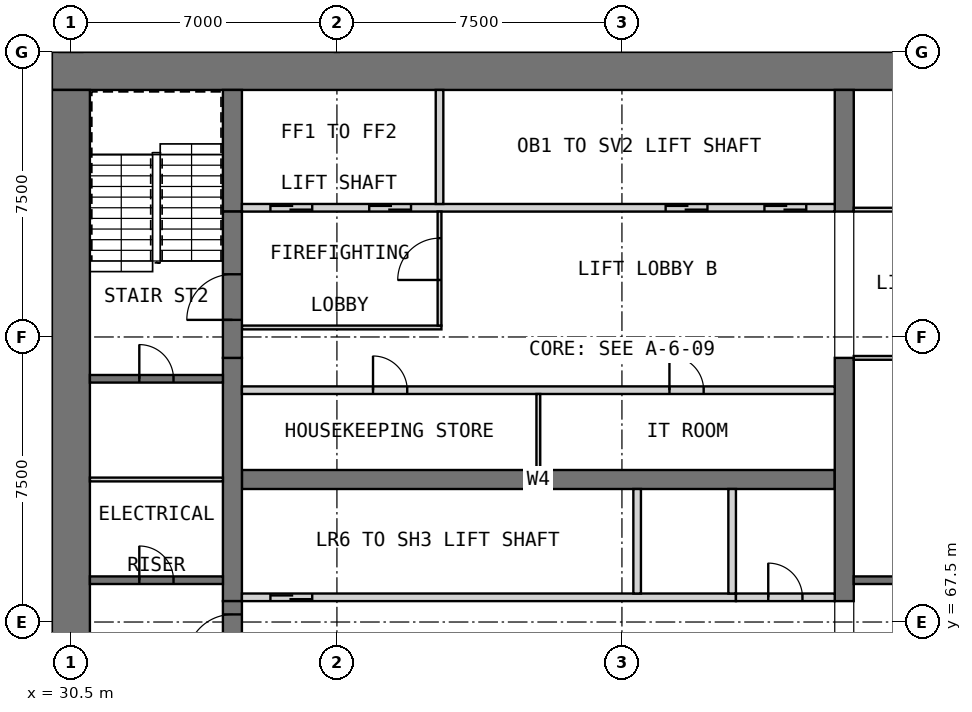
"""IFC4 building model, lengths in metres.
Left out: names, types, materials, properties, quantities, classifications, styles, units other than length and angle.
Written with IfcOpenShell. Run it as: python <this file> out.ifc"""

import sys

from ifc_helpers import new_model, si_unit, direction, frame, frame_2d, origin, place, context, subcontext, project, spatial, rectangle, extrude, element, fill, save


model = new_model("IFC4")
c1 = context("Model", 3, precision=1e-05, world=origin(), true_north=direction((0.0, 1.0)))
c2 = subcontext(c1, "Body", "Model", "MODEL_VIEW")
j1 = project(units=[si_unit("LENGTHUNIT", "METRE"), si_unit("PLANEANGLEUNIT", "RADIAN")], contexts=[c1])
p1 = place(None, origin())
s1 = spatial("IfcSite", under=j1, at=p1, CompositionType="ELEMENT")
p2 = place(p1, origin())
s2 = spatial("IfcBuilding", under=s1, at=p2, CompositionType="ELEMENT")
p3 = place(p2, frame((0.0, 0.0, 48.4)))
s3 = spatial("IfcBuildingStorey", under=s2, at=p3, CompositionType="ELEMENT", Elevation=48.4)
p4 = place(p3, frame((30.0, 82.0, 0.0), z_axis=(0.0, 0.0, 1.0), x_axis=(1.0, 0.0, 0.0)))
e1 = element("IfcWall", 1, at=p4, inside=s3, PredefinedType="SHEAR", context=c2, shape_type="SweptSolid", body=[
    extrude(rectangle(XDim=30.0, YDim=1.0, at=frame_2d((15.0, 0.0))), origin(), (0.0, 0.0, 1.0), 3.6),
])
p5 = place(p3, frame((30.5, 61.0, 0.0), z_axis=(0.0, 0.0, 1.0), x_axis=(0.0, 1.0, 0.0)))
e2 = element("IfcWall", 2, at=p5, inside=s3, PredefinedType="SHEAR", context=c2, shape_type="SweptSolid", body=[
    extrude(rectangle(XDim=20.5, YDim=1.0, at=frame_2d((10.25, 0.0))), origin(), (0.0, 0.0, 1.0), 3.6),
])
p6 = place(p3, frame((35.0, 71.25, 0.0), z_axis=(0.0, 0.0, 1.0), x_axis=(1.0, 0.0, 0.0)))
e3 = element("IfcWall", 3, at=p6, inside=s3, PredefinedType="SHEAR", context=c2, shape_type="SweptSolid", body=[
    extrude(rectangle(XDim=15.6, YDim=0.5, at=frame_2d((7.8, 0.0))), origin(), (0.0, 0.0, 1.0), 3.6),
])
p7 = place(p3, frame((34.75, 68.05, 0.0), z_axis=(0.0, 0.0, 1.0), x_axis=(0.0, 1.0, 0.0)))
e4 = element("IfcWall", 4, at=p7, inside=s3, PredefinedType="SHEAR", context=c2, shape_type="SweptSolid", body=[
    extrude(rectangle(XDim=6.4, YDim=0.5, at=frame_2d((3.2, 0.0))), origin(), (0.0, 0.0, 1.0), 3.6),
])
p8 = place(p3, frame((34.75, 78.3, 0.0), z_axis=(0.0, 0.0, 1.0), x_axis=(0.0, 1.0, 0.0)))
e5 = element("IfcWall", 5, at=p8, inside=s3, PredefinedType="SHEAR", context=c2, shape_type="SweptSolid", body=[
    extrude(rectangle(XDim=3.2, YDim=0.5, at=frame_2d((1.6, 0.0))), origin(), (0.0, 0.0, 1.0), 3.6),
])
p9 = place(p3, frame((50.85, 68.05, 0.0), z_axis=(0.0, 0.0, 1.0), x_axis=(0.0, 1.0, 0.0)))
e6 = element("IfcWall", 6, at=p9, inside=s3, PredefinedType="SHEAR", context=c2, shape_type="SweptSolid", body=[
    extrude(rectangle(XDim=6.4, YDim=0.5, at=frame_2d((3.2, 0.0))), origin(), (0.0, 0.0, 1.0), 3.6),
])
p10 = place(p3, frame((50.85, 78.3, 0.0), z_axis=(0.0, 0.0, 1.0), x_axis=(0.0, 1.0, 0.0)))
e7 = element("IfcWall", 7, at=p10, inside=s3, PredefinedType="SHEAR", context=c2, shape_type="SweptSolid", body=[
    extrude(rectangle(XDim=3.2, YDim=0.5, at=frame_2d((1.6, 0.0))), origin(), (0.0, 0.0, 1.0), 3.6),
])
p11 = place(p3, frame((35.0, 68.15, 0.0), z_axis=(0.0, 0.0, 1.0), x_axis=(1.0, 0.0, 0.0)))
e8 = element("IfcWall", 8, at=p11, inside=s3, PredefinedType="SOLIDWALL", context=c2, shape_type="SweptSolid", body=[
    extrude(rectangle(XDim=13.0, YDim=0.2, at=frame_2d((6.5, 0.0))), origin(), (0.0, 0.0, 1.0), 3.6),
])
p12 = place(p11, frame((0.75, 0.0, 0.0)))
e9 = element("IfcOpeningElement", 9, at=p12, cuts=e8, PredefinedType="OPENING", context=c2, shape_type="SweptSolid", body=[
    extrude(rectangle(XDim=1.1, YDim=2.1, at=frame_2d((0.55, 1.05))), frame((0.0, 0.11, 0.0), z_axis=(0.0, -1.0, 0.0), x_axis=(1.0, 0.0, 0.0)), (0.0, 0.0, 1.0), 0.22),
])
for number, where, z_axis, x_axis in (
    (10, (45.4, 68.25, 0.0), (0.0, 0.0, 1.0), (0.0, 1.0, 0.0)),
    (11, (47.9, 68.25, 0.0), (0.0, 0.0, 1.0), (0.0, 1.0, 0.0)),
):
    element("IfcWall", number, at=place(p3, frame(where, z_axis=z_axis, x_axis=x_axis)), inside=s3, PredefinedType="SOLIDWALL", context=c2, shape_type="SweptSolid", body=[
        extrude(rectangle(XDim=2.75, YDim=0.2, at=frame_2d((1.375, 0.0))), origin(), (0.0, 0.0, 1.0), 3.6),
    ])
p13 = place(p3, frame((48.0, 68.15, 0.0), z_axis=(0.0, 0.0, 1.0), x_axis=(1.0, 0.0, 0.0)))
e12 = element("IfcWall", 12, at=p13, inside=s3, PredefinedType="PARTITIONING", context=c2, shape_type="SweptSolid", body=[
    extrude(rectangle(XDim=2.6, YDim=0.2, at=frame_2d((1.3, 0.0))), origin(), (0.0, 0.0, 1.0), 3.35),
])
p14 = place(p13, frame((0.85, 0.0, 0.0)))
e13 = element("IfcOpeningElement", 13, at=p14, cuts=e12, PredefinedType="OPENING", context=c2, shape_type="SweptSolid", body=[
    extrude(rectangle(XDim=0.9, YDim=2.1, at=frame_2d((0.45, 1.05))), frame((0.0, 0.11, 0.0), z_axis=(0.0, -1.0, 0.0), x_axis=(1.0, 0.0, 0.0)), (0.0, 0.0, 1.0), 0.22),
])
p15 = place(p3, frame((35.0, 73.6, 0.0), z_axis=(0.0, 0.0, 1.0), x_axis=(1.0, 0.0, 0.0)))
e14 = element("IfcWall", 14, at=p15, inside=s3, PredefinedType="PARTITIONING", context=c2, shape_type="SweptSolid", body=[
    extrude(rectangle(XDim=15.6, YDim=0.2, at=frame_2d((7.8, 0.0))), origin(), (0.0, 0.0, 1.0), 3.35),
])
p16 = place(p15, frame((3.45, 0.0, 0.0)))
e15 = element("IfcOpeningElement", 15, at=p16, cuts=e14, PredefinedType="OPENING", context=c2, shape_type="SweptSolid", body=[
    extrude(rectangle(XDim=0.9, YDim=2.1, at=frame_2d((0.45, 1.05))), frame((0.0, 0.11, 0.0), z_axis=(0.0, -1.0, 0.0), x_axis=(1.0, 0.0, 0.0)), (0.0, 0.0, 1.0), 0.22),
])
p17 = place(p15, frame((11.25, 0.0, 0.0)))
e16 = element("IfcOpeningElement", 16, at=p17, cuts=e14, PredefinedType="OPENING", context=c2, shape_type="SweptSolid", body=[
    extrude(rectangle(XDim=0.9, YDim=2.1, at=frame_2d((0.45, 1.05))), frame((0.0, 0.11, 0.0), z_axis=(0.0, -1.0, 0.0), x_axis=(1.0, 0.0, 0.0)), (0.0, 0.0, 1.0), 0.22),
])
p18 = place(p3, frame((42.8, 71.5, 0.0), z_axis=(0.0, 0.0, 1.0), x_axis=(0.0, 1.0, 0.0)))
e17 = element("IfcWall", 17, at=p18, inside=s3, PredefinedType="PARTITIONING", context=c2, shape_type="SweptSolid", body=[
    extrude(rectangle(XDim=2.0, YDim=0.1, at=frame_2d((1.0, 0.0))), origin(), (0.0, 0.0, 1.0), 3.35),
])
p19 = place(p3, frame((35.0, 78.4, 0.0), z_axis=(0.0, 0.0, 1.0), x_axis=(1.0, 0.0, 0.0)))
e18 = element("IfcWall", 18, at=p19, inside=s3, PredefinedType="SOLIDWALL", context=c2, shape_type="SweptSolid", body=[
    extrude(rectangle(XDim=15.6, YDim=0.2, at=frame_2d((7.8, 0.0))), origin(), (0.0, 0.0, 1.0), 3.6),
])
p20 = place(p19, frame((0.75, 0.0, 0.0)))
e19 = element("IfcOpeningElement", 19, at=p20, cuts=e18, PredefinedType="OPENING", context=c2, shape_type="SweptSolid", body=[
    extrude(rectangle(XDim=1.1, YDim=2.1, at=frame_2d((0.55, 1.05))), frame((0.0, 0.11, 0.0), z_axis=(0.0, -1.0, 0.0), x_axis=(1.0, 0.0, 0.0)), (0.0, 0.0, 1.0), 0.22),
])
p21 = place(p19, frame((3.35, 0.0, 0.0)))
e20 = element("IfcOpeningElement", 20, at=p21, cuts=e18, PredefinedType="OPENING", context=c2, shape_type="SweptSolid", body=[
    extrude(rectangle(XDim=1.1, YDim=2.1, at=frame_2d((0.55, 1.05))), frame((0.0, 0.11, 0.0), z_axis=(0.0, -1.0, 0.0), x_axis=(1.0, 0.0, 0.0)), (0.0, 0.0, 1.0), 0.22),
])
p22 = place(p19, frame((11.15, 0.0, 0.0)))
e21 = element("IfcOpeningElement", 21, at=p22, cuts=e18, PredefinedType="OPENING", context=c2, shape_type="SweptSolid", body=[
    extrude(rectangle(XDim=1.1, YDim=2.1, at=frame_2d((0.55, 1.05))), frame((0.0, 0.11, 0.0), z_axis=(0.0, -1.0, 0.0), x_axis=(1.0, 0.0, 0.0)), (0.0, 0.0, 1.0), 0.22),
])
p23 = place(p19, frame((13.75, 0.0, 0.0)))
e22 = element("IfcOpeningElement", 22, at=p23, cuts=e18, PredefinedType="OPENING", context=c2, shape_type="SweptSolid", body=[
    extrude(rectangle(XDim=1.1, YDim=2.1, at=frame_2d((0.55, 1.05))), frame((0.0, 0.11, 0.0), z_axis=(0.0, -1.0, 0.0), x_axis=(1.0, 0.0, 0.0)), (0.0, 0.0, 1.0), 0.22),
])
p24 = place(p3, frame((40.2, 78.5, 0.0), z_axis=(0.0, 0.0, 1.0), x_axis=(0.0, 1.0, 0.0)))
e23 = element("IfcWall", 23, at=p24, inside=s3, PredefinedType="SOLIDWALL", context=c2, shape_type="SweptSolid", body=[
    extrude(rectangle(XDim=3.0, YDim=0.2, at=frame_2d((1.5, 0.0))), origin(), (0.0, 0.0, 1.0), 3.6),
])
p25 = place(p3, frame((35.0, 75.25, 0.0), z_axis=(0.0, 0.0, 1.0), x_axis=(1.0, 0.0, 0.0)))
e24 = element("IfcWall", 24, at=p25, inside=s3, PredefinedType="PARTITIONING", context=c2, shape_type="SweptSolid", body=[
    extrude(rectangle(XDim=5.25, YDim=0.1, at=frame_2d((2.625, 0.0))), origin(), (0.0, 0.0, 1.0), 3.35),
])
p26 = place(p3, frame((40.2, 75.3, 0.0), z_axis=(0.0, 0.0, 1.0), x_axis=(0.0, 1.0, 0.0)))
e25 = element("IfcWall", 25, at=p26, inside=s3, PredefinedType="PARTITIONING", context=c2, shape_type="SweptSolid", body=[
    extrude(rectangle(XDim=3.0, YDim=0.1, at=frame_2d((1.5, 0.0))), origin(), (0.0, 0.0, 1.0), 3.35),
])
p27 = place(p26, frame((1.2, 0.0, 0.0)))
e26 = element("IfcOpeningElement", 26, at=p27, cuts=e25, PredefinedType="OPENING", context=c2, shape_type="SweptSolid", body=[
    extrude(rectangle(XDim=1.1, YDim=2.1, at=frame_2d((0.55, 1.05))), frame((0.0, 0.06, 0.0), z_axis=(0.0, -1.0, 0.0), x_axis=(1.0, 0.0, 0.0)), (0.0, 0.0, 1.0), 0.12),
])
p28 = place(p3, frame((34.75, 64.2, 0.0), z_axis=(0.0, 0.0, 1.0), x_axis=(0.0, 1.0, 0.0)))
e27 = element("IfcWall", 27, at=p28, inside=s3, PredefinedType="SOLIDWALL", context=c2, shape_type="SweptSolid", body=[
    extrude(rectangle(XDim=3.85, YDim=0.5, at=frame_2d((1.925, 0.0))), origin(), (0.0, 0.0, 1.0), 2.4),
])
p29 = place(p28, frame((2.3, 0.0, 0.0)))
e28 = element("IfcOpeningElement", 28, at=p29, cuts=e27, PredefinedType="OPENING", context=c2, shape_type="SweptSolid", body=[
    extrude(rectangle(XDim=1.2, YDim=2.1, at=frame_2d((0.6, 1.05))), frame((0.0, 0.26, 0.0), z_axis=(0.0, -1.0, 0.0), x_axis=(1.0, 0.0, 0.0)), (0.0, 0.0, 1.0), 0.52),
])
p30 = place(p3, frame((34.75, 74.45, 0.0), z_axis=(0.0, 0.0, 1.0), x_axis=(0.0, 1.0, 0.0)))
e29 = element("IfcWall", 29, at=p30, inside=s3, PredefinedType="SOLIDWALL", context=c2, shape_type="SweptSolid", body=[
    extrude(rectangle(XDim=3.85, YDim=0.5, at=frame_2d((1.925, 0.0))), origin(), (0.0, 0.0, 1.0), 2.4),
])
p31 = place(p30, frame((1.0, 0.0, 0.0)))
e30 = element("IfcOpeningElement", 30, at=p31, cuts=e29, PredefinedType="OPENING", context=c2, shape_type="SweptSolid", body=[
    extrude(rectangle(XDim=1.2, YDim=2.1, at=frame_2d((0.6, 1.05))), frame((0.0, 0.26, 0.0), z_axis=(0.0, -1.0, 0.0), x_axis=(1.0, 0.0, 0.0)), (0.0, 0.0, 1.0), 0.52),
])
p32 = place(p3, frame((31.0, 68.6, 0.0), z_axis=(0.0, 0.0, 1.0), x_axis=(1.0, 0.0, 0.0)))
e31 = element("IfcWall", 31, at=p32, inside=s3, PredefinedType="SOLIDWALL", context=c2, shape_type="SweptSolid", body=[
    extrude(rectangle(XDim=3.5, YDim=0.2, at=frame_2d((1.75, 0.0))), origin(), (0.0, 0.0, 1.0), 3.35),
])
p33 = place(p32, frame((1.3, 0.0, 0.0)))
e32 = element("IfcOpeningElement", 32, at=p33, cuts=e31, PredefinedType="OPENING", context=c2, shape_type="SweptSolid", body=[
    extrude(rectangle(XDim=0.9, YDim=2.1, at=frame_2d((0.45, 1.05))), frame((0.0, 0.11, 0.0), z_axis=(0.0, -1.0, 0.0), x_axis=(1.0, 0.0, 0.0)), (0.0, 0.0, 1.0), 0.22),
])
p34 = place(p3, frame((31.0, 73.9, 0.0), z_axis=(0.0, 0.0, 1.0), x_axis=(1.0, 0.0, 0.0)))
e33 = element("IfcWall", 33, at=p34, inside=s3, PredefinedType="SOLIDWALL", context=c2, shape_type="SweptSolid", body=[
    extrude(rectangle(XDim=3.5, YDim=0.2, at=frame_2d((1.75, 0.0))), origin(), (0.0, 0.0, 1.0), 3.35),
])
p35 = place(p34, frame((1.3, 0.0, 0.0)))
e34 = element("IfcOpeningElement", 34, at=p35, cuts=e33, PredefinedType="OPENING", context=c2, shape_type="SweptSolid", body=[
    extrude(rectangle(XDim=0.9, YDim=2.1, at=frame_2d((0.45, 1.05))), frame((0.0, 0.11, 0.0), z_axis=(0.0, -1.0, 0.0), x_axis=(1.0, 0.0, 0.0)), (0.0, 0.0, 1.0), 0.22),
])
p36 = place(p3, frame((51.1, 68.6, 0.0), z_axis=(0.0, 0.0, 1.0), x_axis=(1.0, 0.0, 0.0)))
e35 = element("IfcWall", 35, at=p36, inside=s3, PredefinedType="SOLIDWALL", context=c2, shape_type="SweptSolid", body=[
    extrude(rectangle(XDim=7.9, YDim=0.2, at=frame_2d((3.95, 0.0))), origin(), (0.0, 0.0, 1.0), 3.35),
])
p37 = place(p3, frame((31.0, 71.25, 0.0), z_axis=(0.0, 0.0, 1.0), x_axis=(1.0, 0.0, 0.0)))
e36 = element("IfcWall", 36, at=p37, inside=s3, PredefinedType="PARTITIONING", context=c2, shape_type="SweptSolid", body=[
    extrude(rectangle(XDim=3.5, YDim=0.1, at=frame_2d((1.75, 0.0))), origin(), (0.0, 0.0, 1.0), 3.35),
])
p38 = place(p3, frame((51.1, 74.45, 0.0), z_axis=(0.0, 0.0, 1.0), x_axis=(1.0, 0.0, 0.0)))
e37 = element("IfcWall", 37, at=p38, inside=s3, PredefinedType="PARTITIONING", context=c2, shape_type="SweptSolid", body=[
    extrude(rectangle(XDim=7.9, YDim=0.1, at=frame_2d((3.95, 0.0))), origin(), (0.0, 0.0, 1.0), 3.35),
])
p39 = place(p38, frame((3.5, 0.0, 0.0)))
e38 = element("IfcOpeningElement", 38, at=p39, cuts=e37, PredefinedType="OPENING", context=c2, shape_type="SweptSolid", body=[
    extrude(rectangle(XDim=0.9, YDim=2.1, at=frame_2d((0.45, 1.05))), frame((0.0, 0.06, 0.0), z_axis=(0.0, -1.0, 0.0), x_axis=(1.0, 0.0, 0.0)), (0.0, 0.0, 1.0), 0.12),
])
p40 = place(p3, frame((51.1, 78.35, 0.0), z_axis=(0.0, 0.0, 1.0), x_axis=(1.0, 0.0, 0.0)))
e39 = element("IfcWall", 39, at=p40, inside=s3, PredefinedType="PARTITIONING", context=c2, shape_type="SweptSolid", body=[
    extrude(rectangle(XDim=7.9, YDim=0.1, at=frame_2d((3.95, 0.0))), origin(), (0.0, 0.0, 1.0), 3.35),
])
p41 = place(p40, frame((3.5, 0.0, 0.0)))
e40 = element("IfcOpeningElement", 40, at=p41, cuts=e39, PredefinedType="OPENING", context=c2, shape_type="SweptSolid", body=[
    extrude(rectangle(XDim=0.9, YDim=2.1, at=frame_2d((0.45, 1.05))), frame((0.0, 0.06, 0.0), z_axis=(0.0, -1.0, 0.0), x_axis=(1.0, 0.0, 0.0)), (0.0, 0.0, 1.0), 0.12),
])
p42 = place(p3, frame((37.5, 82.5, 0.0), z_axis=(0.0, 0.0, 1.0), x_axis=(0.0, 1.0, 0.0)))
e41 = element("IfcWall", 41, at=p42, inside=s3, PredefinedType="PARTITIONING", context=c2, shape_type="SweptSolid", body=[
    extrude(rectangle(XDim=7.425, YDim=0.1, at=frame_2d((3.712, 0.0))), origin(), (0.0, 0.0, 1.0), 3.35),
])
p43 = place(p12, origin())
e42 = element("IfcDoor", 42, at=p43, inside=s3, OperationType="DOUBLE_DOOR_SLIDING", PredefinedType="DOOR", context=c2, shape_type="SweptSolid", body=[
    extrude(rectangle(XDim=1.1, YDim=2.1, at=frame_2d((0.55, 1.05))), frame((0.0, 0.025, 0.0), z_axis=(0.0, -1.0, 0.0), x_axis=(1.0, 0.0, 0.0)), (0.0, 0.0, 1.0), 0.05),
])
fill(e9, e42)
p44 = place(p14, origin())
e43 = element("IfcDoor", 43, at=p44, inside=s3, OperationType="SINGLE_SWING_RIGHT", PredefinedType="DOOR", context=c2, shape_type="SweptSolid", body=[
    extrude(rectangle(XDim=0.9, YDim=2.1, at=frame_2d((0.45, 1.05))), frame((0.0, 0.025, 0.0), z_axis=(0.0, -1.0, 0.0), x_axis=(1.0, 0.0, 0.0)), (0.0, 0.0, 1.0), 0.05),
])
fill(e13, e43)
p45 = place(p16, origin())
e44 = element("IfcDoor", 44, at=p45, inside=s3, OperationType="SINGLE_SWING_RIGHT", PredefinedType="DOOR", context=c2, shape_type="SweptSolid", body=[
    extrude(rectangle(XDim=0.9, YDim=2.1, at=frame_2d((0.45, 1.05))), frame((0.0, 0.025, 0.0), z_axis=(0.0, -1.0, 0.0), x_axis=(1.0, 0.0, 0.0)), (0.0, 0.0, 1.0), 0.05),
])
fill(e15, e44)
p46 = place(p17, origin())
e45 = element("IfcDoor", 45, at=p46, inside=s3, OperationType="SINGLE_SWING_LEFT", PredefinedType="DOOR", context=c2, shape_type="SweptSolid", body=[
    extrude(rectangle(XDim=0.9, YDim=2.1, at=frame_2d((0.45, 1.05))), frame((0.0, 0.025, 0.0), z_axis=(0.0, -1.0, 0.0), x_axis=(1.0, 0.0, 0.0)), (0.0, 0.0, 1.0), 0.05),
])
fill(e16, e45)
p47 = place(p20, origin())
e46 = element("IfcDoor", 46, at=p47, inside=s3, OperationType="DOUBLE_DOOR_SLIDING", PredefinedType="DOOR", context=c2, shape_type="SweptSolid", body=[
    extrude(rectangle(XDim=1.1, YDim=2.1, at=frame_2d((0.55, 1.05))), frame((0.0, 0.025, 0.0), z_axis=(0.0, -1.0, 0.0), x_axis=(1.0, 0.0, 0.0)), (0.0, 0.0, 1.0), 0.05),
])
fill(e19, e46)
p48 = place(p21, origin())
e47 = element("IfcDoor", 47, at=p48, inside=s3, OperationType="DOUBLE_DOOR_SLIDING", PredefinedType="DOOR", context=c2, shape_type="SweptSolid", body=[
    extrude(rectangle(XDim=1.1, YDim=2.1, at=frame_2d((0.55, 1.05))), frame((0.0, 0.025, 0.0), z_axis=(0.0, -1.0, 0.0), x_axis=(1.0, 0.0, 0.0)), (0.0, 0.0, 1.0), 0.05),
])
fill(e20, e47)
p49 = place(p22, origin())
e48 = element("IfcDoor", 48, at=p49, inside=s3, OperationType="DOUBLE_DOOR_SLIDING", PredefinedType="DOOR", context=c2, shape_type="SweptSolid", body=[
    extrude(rectangle(XDim=1.1, YDim=2.1, at=frame_2d((0.55, 1.05))), frame((0.0, 0.025, 0.0), z_axis=(0.0, -1.0, 0.0), x_axis=(1.0, 0.0, 0.0)), (0.0, 0.0, 1.0), 0.05),
])
fill(e21, e48)
p50 = place(p23, origin())
e49 = element("IfcDoor", 49, at=p50, inside=s3, OperationType="DOUBLE_DOOR_SLIDING", PredefinedType="DOOR", context=c2, shape_type="SweptSolid", body=[
    extrude(rectangle(XDim=1.1, YDim=2.1, at=frame_2d((0.55, 1.05))), frame((0.0, 0.025, 0.0), z_axis=(0.0, -1.0, 0.0), x_axis=(1.0, 0.0, 0.0)), (0.0, 0.0, 1.0), 0.05),
])
fill(e22, e49)
p51 = place(p27, origin())
e50 = element("IfcDoor", 50, at=p51, inside=s3, OperationType="SINGLE_SWING_LEFT", PredefinedType="DOOR", context=c2, shape_type="SweptSolid", body=[
    extrude(rectangle(XDim=1.1, YDim=2.1, at=frame_2d((0.55, 1.05))), frame((0.0, 0.025, 0.0), z_axis=(0.0, -1.0, 0.0), x_axis=(1.0, 0.0, 0.0)), (0.0, 0.0, 1.0), 0.05),
])
fill(e26, e50)
p52 = place(p29, origin())
e51 = element("IfcDoor", 51, at=p52, inside=s3, OperationType="SINGLE_SWING_LEFT", PredefinedType="DOOR", context=c2, shape_type="SweptSolid", body=[
    extrude(rectangle(XDim=1.2, YDim=2.1, at=frame_2d((0.6, 1.05))), frame((0.0, 0.025, 0.0), z_axis=(0.0, -1.0, 0.0), x_axis=(1.0, 0.0, 0.0)), (0.0, 0.0, 1.0), 0.05),
])
fill(e28, e51)
p53 = place(p31, origin())
e52 = element("IfcDoor", 52, at=p53, inside=s3, OperationType="SINGLE_SWING_RIGHT", PredefinedType="DOOR", context=c2, shape_type="SweptSolid", body=[
    extrude(rectangle(XDim=1.2, YDim=2.1, at=frame_2d((0.6, 1.05))), frame((0.0, 0.025, 0.0), z_axis=(0.0, -1.0, 0.0), x_axis=(1.0, 0.0, 0.0)), (0.0, 0.0, 1.0), 0.05),
])
fill(e30, e52)
p54 = place(p33, origin())
e53 = element("IfcDoor", 53, at=p54, inside=s3, OperationType="SINGLE_SWING_LEFT", PredefinedType="DOOR", context=c2, shape_type="SweptSolid", body=[
    extrude(rectangle(XDim=0.9, YDim=2.1, at=frame_2d((0.45, 1.05))), frame((0.0, 0.025, 0.0), z_axis=(0.0, -1.0, 0.0), x_axis=(1.0, 0.0, 0.0)), (0.0, 0.0, 1.0), 0.05),
])
fill(e32, e53)
p55 = place(p35, origin())
e54 = element("IfcDoor", 54, at=p55, inside=s3, OperationType="SINGLE_SWING_RIGHT", PredefinedType="DOOR", context=c2, shape_type="SweptSolid", body=[
    extrude(rectangle(XDim=0.9, YDim=2.1, at=frame_2d((0.45, 1.05))), frame((0.0, 0.025, 0.0), z_axis=(0.0, -1.0, 0.0), x_axis=(1.0, 0.0, 0.0)), (0.0, 0.0, 1.0), 0.05),
])
fill(e34, e54)
save(model, sys.argv[1])
